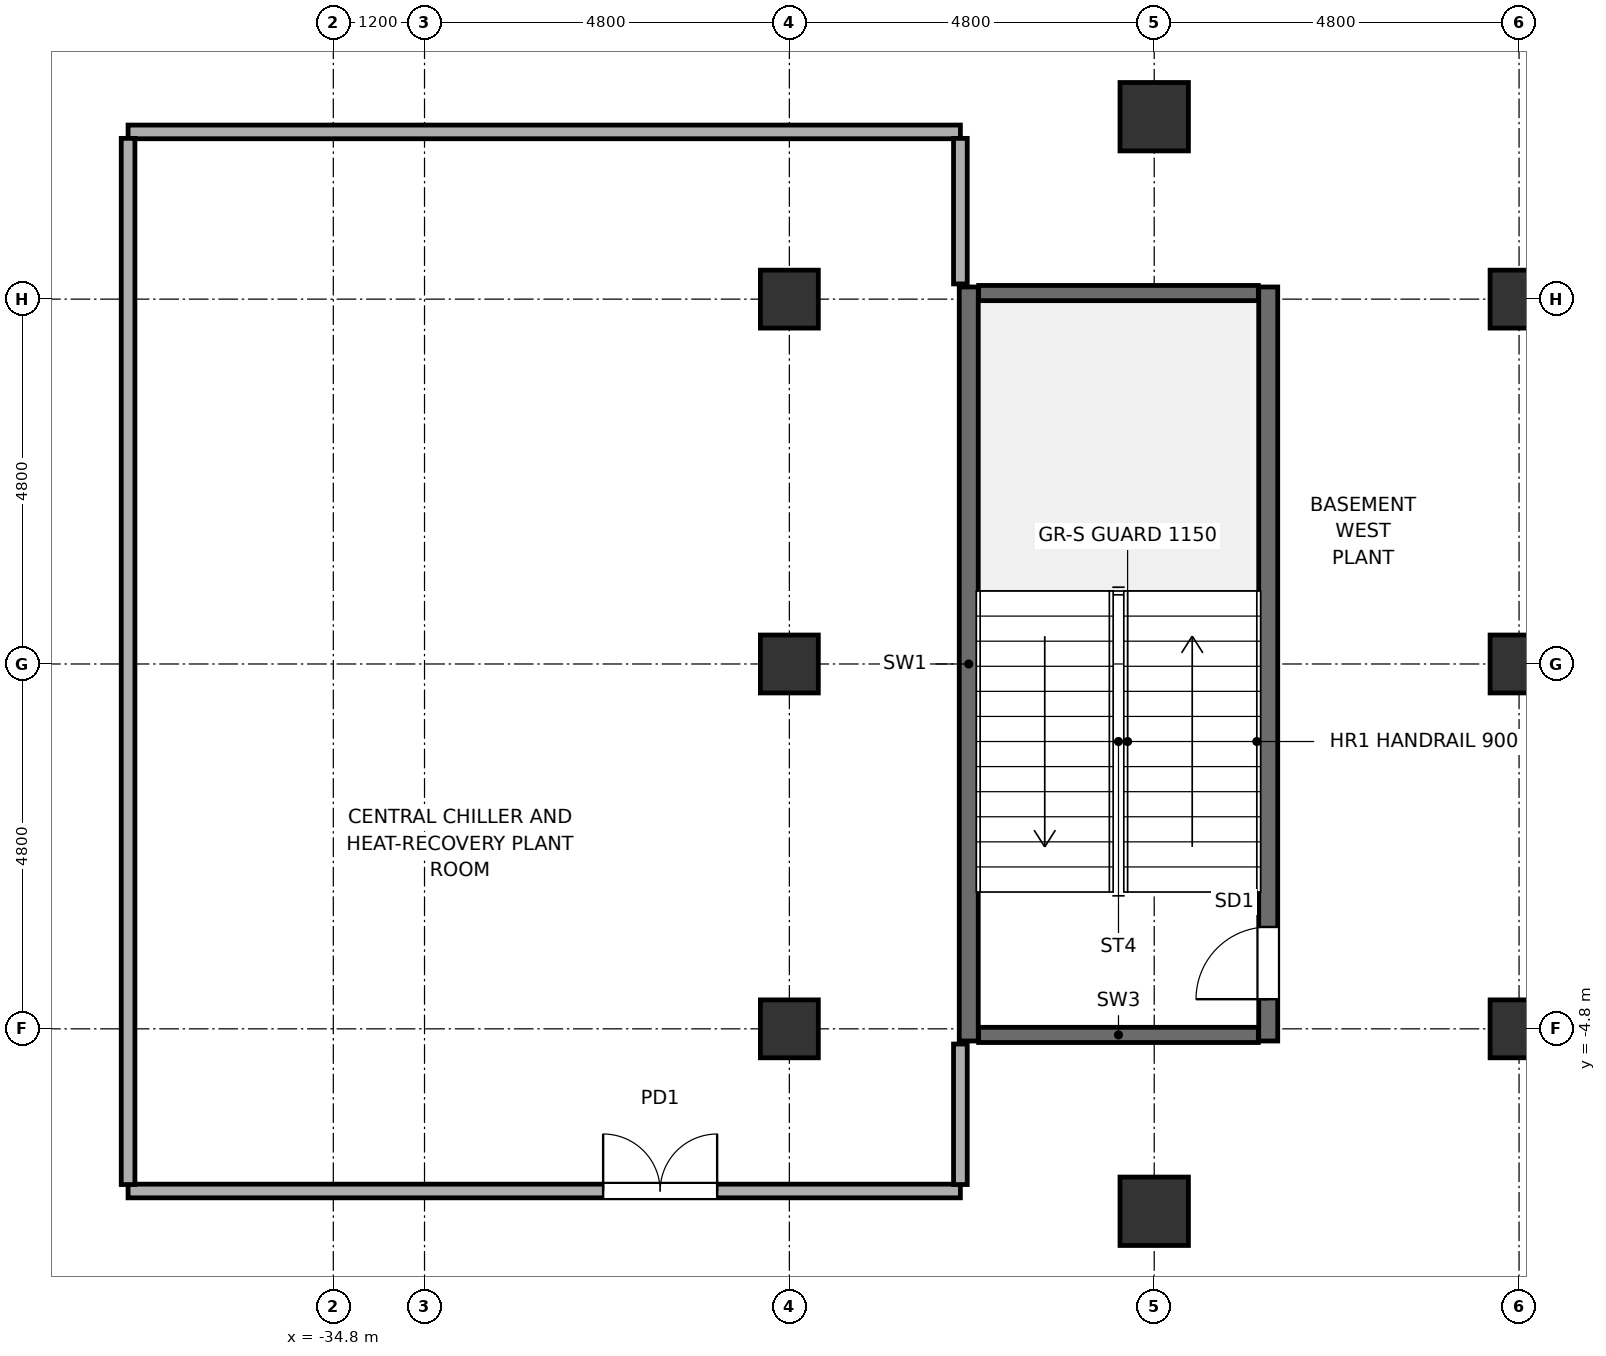
"""IFC4 building model, lengths in metres.
Left out: names, types, materials, properties, quantities, classifications, styles, units other than length and angle.
Written with IfcOpenShell. Run it as: python <this file> out.ifc"""

import sys

from ifc_helpers import new_model, si_unit, direction, frame, frame_2d, origin, origin_2d, place, context, subcontext, project, spatial, rectangle, hollow_rectangle, hollow_circle, extrude, element, fill, save


model = new_model("IFC4")
c1 = context("Model", 3, precision=1e-05, world=origin(), true_north=direction((0.0, 1.0)))
c2 = subcontext(c1, "Body", "Model", "MODEL_VIEW")
j1 = project(units=[si_unit("LENGTHUNIT", "METRE"), si_unit("PLANEANGLEUNIT", "RADIAN")], contexts=[c1])
p1 = place(None, origin())
s1 = spatial("IfcSite", under=j1, at=p1, CompositionType="ELEMENT")
p2 = place(p1, origin())
s2 = spatial("IfcBuilding", under=s1, at=p2, CompositionType="ELEMENT")
p3 = place(p2, frame((0.0, 0.0, -10.2)))
s3 = spatial("IfcBuildingStorey", under=s2, at=p3, CompositionType="ELEMENT", Elevation=-10.2)
for number, where, z_axis, x_axis in (
    (1, (-28.8, -4.8, -0.25), (0.0, 0.0, 1.0), (1.0, 0.0, 0.0)),
    (2, (-28.8, 0.0, -0.25), (0.0, 0.0, 1.0), (1.0, 0.0, 0.0)),
    (3, (-28.8, 4.8, -0.25), (0.0, 0.0, 1.0), (1.0, 0.0, 0.0)),
):
    element("IfcColumn", number, at=place(p3, frame(where, z_axis=z_axis, x_axis=x_axis)), inside=s3, PredefinedType="COLUMN", context=c2, shape_type="SweptSolid", body=[
        extrude(hollow_circle(Radius=0.381, WallThickness=0.032, at=origin_2d()), origin(), (0.0, 0.0, 1.0), 5.05),
    ])
for number, where, z_axis, x_axis in (
    (4, (-24.0, -7.2, -0.25), (0.0, 0.0, 1.0), (1.0, 0.0, 0.0)),
    (5, (-24.0, 7.2, -0.25), (0.0, 0.0, 1.0), (1.0, 0.0, 0.0)),
):
    element("IfcColumn", number, at=place(p3, frame(where, z_axis=z_axis, x_axis=x_axis)), inside=s3, PredefinedType="COLUMN", context=c2, shape_type="SweptSolid", body=[
        extrude(hollow_rectangle(XDim=0.9, YDim=0.9, WallThickness=0.04, at=origin_2d()), origin(), (0.0, 0.0, 1.0), 5.05),
    ])
for number, where, z_axis, x_axis in (
    (6, (-19.2, -4.8, -0.25), (0.0, 0.0, 1.0), (1.0, 0.0, 0.0)),
    (7, (-19.2, 0.0, -0.25), (0.0, 0.0, 1.0), (1.0, 0.0, 0.0)),
    (8, (-19.2, 4.8, -0.25), (0.0, 0.0, 1.0), (1.0, 0.0, 0.0)),
):
    element("IfcColumn", number, at=place(p3, frame(where, z_axis=z_axis, x_axis=x_axis)), inside=s3, PredefinedType="COLUMN", context=c2, shape_type="SweptSolid", body=[
        extrude(hollow_circle(Radius=0.381, WallThickness=0.032, at=origin_2d()), origin(), (0.0, 0.0, 1.0), 5.05),
    ])
p4 = place(p3, frame((-22.5, -4.96, -0.25), z_axis=(0.0, 0.0, 1.0), x_axis=(0.0, 1.0, 0.0)))
e9 = element("IfcWall", 9, at=p4, inside=s3, PredefinedType="SOLIDWALL", context=c2, shape_type="SweptSolid", body=[
    extrude(rectangle(XDim=9.92, YDim=0.25, at=frame_2d((4.96, 0.0))), origin(), (0.0, 0.0, 1.0), 4.8),
])
p5 = place(p4, frame((0.55, 0.0, 0.25)))
e10 = element("IfcOpeningElement", 10, at=p5, cuts=e9, PredefinedType="OPENING", context=c2, shape_type="SweptSolid", body=[
    extrude(rectangle(XDim=0.95, YDim=2.15, at=frame_2d((0.475, 1.075))), frame((0.0, 0.14, 0.0), z_axis=(0.0, -1.0, 0.0), x_axis=(1.0, 0.0, 0.0)), (0.0, 0.0, 1.0), 0.28),
])
p6 = place(p3, frame((-26.44, -4.96, -0.25), z_axis=(0.0, 0.0, 1.0), x_axis=(0.0, 1.0, 0.0)))
e11 = element("IfcWall", 11, at=p6, inside=s3, PredefinedType="SOLIDWALL", context=c2, shape_type="SweptSolid", body=[
    extrude(rectangle(XDim=9.92, YDim=0.25, at=frame_2d((4.96, 0.0))), origin(), (0.0, 0.0, 1.0), 4.8),
])
for number, where, z_axis, x_axis in (
    (12, (-26.31, -4.88, -0.25), (0.0, 0.0, 1.0), (1.0, 0.0, 0.0)),
    (13, (-26.31, 4.88, -0.25), (0.0, 0.0, 1.0), (1.0, 0.0, 0.0)),
):
    element("IfcWall", number, at=place(p3, frame(where, z_axis=z_axis, x_axis=x_axis)), inside=s3, PredefinedType="SOLIDWALL", context=c2, shape_type="SweptSolid", body=[
        extrude(rectangle(XDim=3.68, YDim=0.2, at=frame_2d((1.84, 0.0))), origin(), (0.0, 0.0, 1.0), 4.8),
    ])
p7 = place(p3, frame((-37.5, -6.933, 0.0), z_axis=(0.0, 0.0, 1.0), x_axis=(1.0, 0.0, 0.0)))
e14 = element("IfcWall", 14, at=p7, inside=s3, PredefinedType="PARTITIONING", context=c2, shape_type="SweptSolid", body=[
    extrude(rectangle(XDim=10.95, YDim=0.18, at=frame_2d((5.475, 0.0))), origin(), (0.0, 0.0, 1.0), 3.85),
])
p8 = place(p7, frame((6.25, 0.0, 0.0)))
e15 = element("IfcOpeningElement", 15, at=p8, cuts=e14, PredefinedType="OPENING", context=c2, shape_type="SweptSolid", body=[
    extrude(rectangle(XDim=1.5, YDim=2.2, at=frame_2d((0.75, 1.1))), frame((0.0, 0.105, 0.0), z_axis=(0.0, -1.0, 0.0), x_axis=(1.0, 0.0, 0.0)), (0.0, 0.0, 1.0), 0.21),
])
p9 = place(p3, frame((-37.5, 7.0, 0.0), z_axis=(0.0, 0.0, 1.0), x_axis=(1.0, 0.0, 0.0)))
e16 = element("IfcWall", 16, at=p9, inside=s3, PredefinedType="PARTITIONING", context=c2, shape_type="SweptSolid", body=[
    extrude(rectangle(XDim=10.95, YDim=0.18, at=frame_2d((5.475, 0.0))), origin(), (0.0, 0.0, 1.0), 3.85),
])
p10 = place(p3, frame((-37.5, -6.848, 0.0), z_axis=(0.0, 0.0, 1.0), x_axis=(0.0, 1.0, 0.0)))
e17 = element("IfcWall", 17, at=p10, inside=s3, PredefinedType="PARTITIONING", context=c2, shape_type="SweptSolid", body=[
    extrude(rectangle(XDim=13.763, YDim=0.18, at=frame_2d((6.882, 0.0))), origin(), (0.0, 0.0, 1.0), 4.55),
])
p11 = place(p3, frame((-26.55, -6.848, 0.0), z_axis=(0.0, 0.0, 1.0), x_axis=(0.0, 1.0, 0.0)))
e18 = element("IfcWall", 18, at=p11, inside=s3, PredefinedType="PARTITIONING", context=c2, shape_type="SweptSolid", body=[
    extrude(rectangle(XDim=1.848, YDim=0.18, at=frame_2d((0.924, 0.0))), origin(), (0.0, 0.0, 1.0), 4.55),
])
p12 = place(p3, frame((-26.55, 5.0, 0.0), z_axis=(0.0, 0.0, 1.0), x_axis=(0.0, 1.0, 0.0)))
e19 = element("IfcWall", 19, at=p12, inside=s3, PredefinedType="PARTITIONING", context=c2, shape_type="SweptSolid", body=[
    extrude(rectangle(XDim=1.915, YDim=0.18, at=frame_2d((0.958, 0.0))), origin(), (0.0, 0.0, 1.0), 4.55),
])
p13 = place(p5, origin())
e20 = element("IfcDoor", 20, at=p13, inside=s3, OperationType="SINGLE_SWING_LEFT", PredefinedType="DOOR", context=c2, shape_type="SweptSolid", body=[
    extrude(rectangle(XDim=0.95, YDim=2.15, at=frame_2d((0.475, 1.075))), frame((0.0, 0.025, 0.0), z_axis=(0.0, -1.0, 0.0), x_axis=(1.0, 0.0, 0.0)), (0.0, 0.0, 1.0), 0.05),
])
fill(e10, e20)
p14 = place(p8, origin())
e21 = element("IfcDoor", 21, at=p14, inside=s3, OperationType="DOUBLE_DOOR_SINGLE_SWING", PredefinedType="DOOR", context=c2, shape_type="SweptSolid", body=[
    extrude(rectangle(XDim=1.5, YDim=2.2, at=frame_2d((0.75, 1.1))), frame((0.0, 0.025, 0.0), z_axis=(0.0, -1.0, 0.0), x_axis=(1.0, 0.0, 0.0)), (0.0, 0.0, 1.0), 0.05),
])
fill(e15, e21)
save(model, sys.argv[1])
